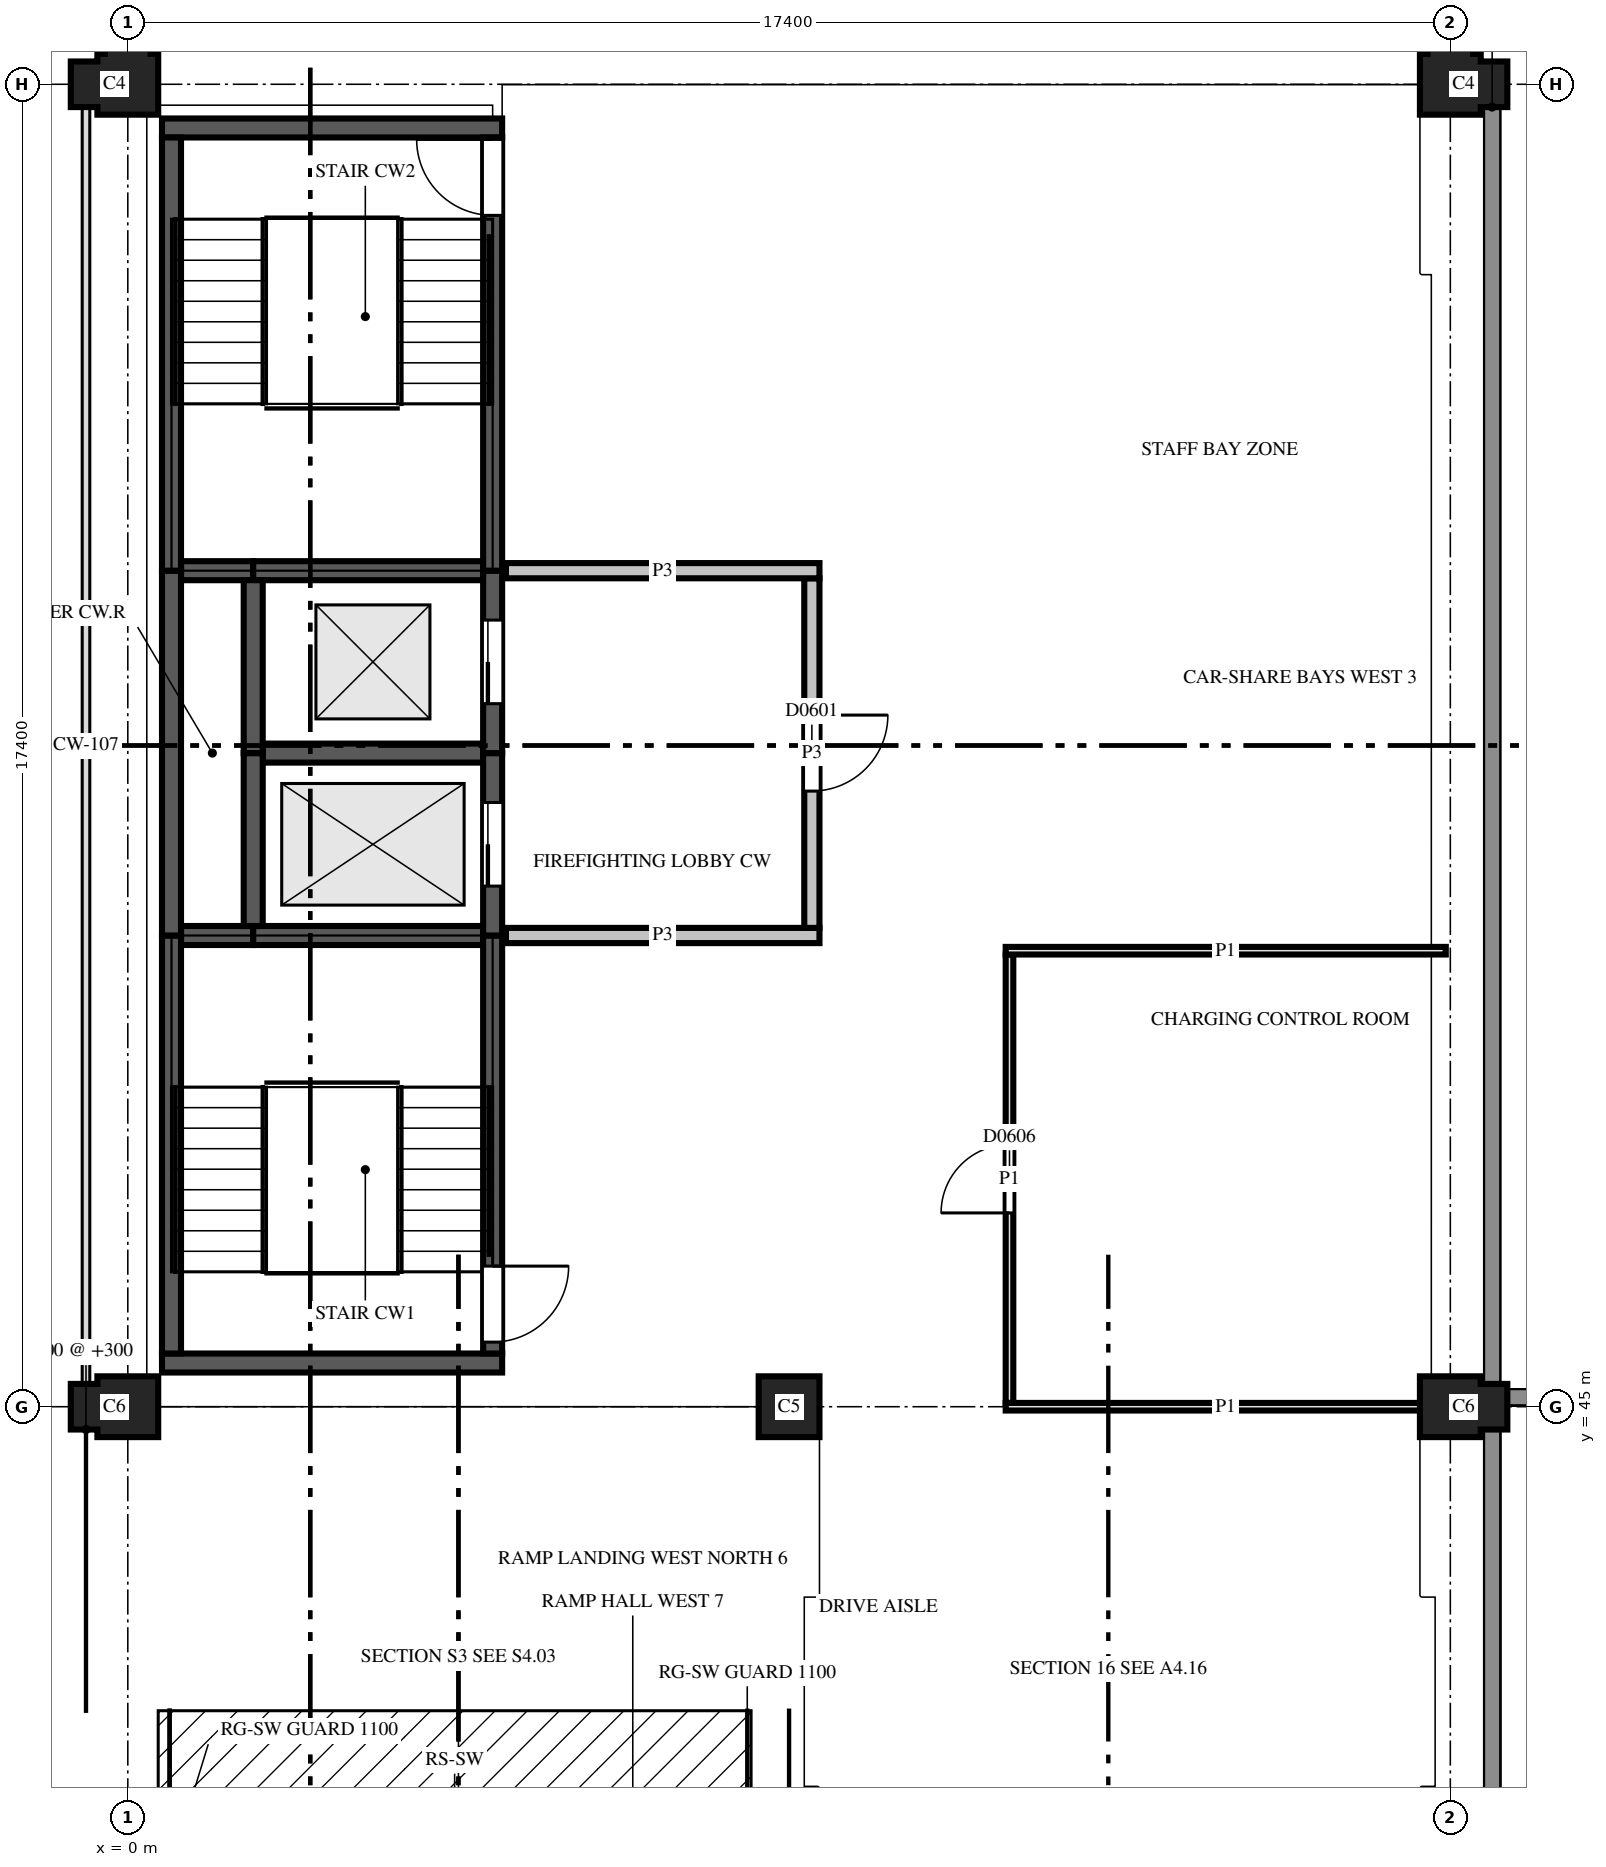
"""IFC4 building model, lengths in metres.
Left out: names, types, materials, properties, quantities, classifications, styles, units other than length and angle.
Written with IfcOpenShell. Run it as: python <this file> out.ifc"""

import sys

from ifc_helpers import new_model, si_unit, direction, frame, frame_2d, origin, place, context, subcontext, project, spatial, polyline, rectangle, outline, extrude, element, fill, save


model = new_model("IFC4")
c1 = context("Model", 3, precision=1e-05, world=origin(), true_north=direction((0.0, 1.0)))
c2 = subcontext(c1, "Body", "Model", "MODEL_VIEW")
j1 = project(units=[si_unit("LENGTHUNIT", "METRE"), si_unit("PLANEANGLEUNIT", "RADIAN")], contexts=[c1])
p1 = place(None, origin())
s1 = spatial("IfcSite", under=j1, at=p1, CompositionType="ELEMENT")
p2 = place(p1, origin())
s2 = spatial("IfcBuilding", under=s1, at=p2, CompositionType="ELEMENT")
p3 = place(p2, frame((0.0, 0.0, 23.0)))
s3 = spatial("IfcBuildingStorey", under=s2, at=p3, CompositionType="ELEMENT", Elevation=23.0)
p4 = place(p3, frame((0.0, 45.0, 0.0), z_axis=(0.0, 0.0, 1.0), x_axis=(-1.0, 0.0, 0.0)))
e1 = element("IfcColumn", 1, at=p4, inside=s3, PredefinedType="COLUMN", context=c2, shape_type="SweptSolid", body=[
    extrude(outline(polyline([(-0.4, -0.4), (0.4, -0.4), (0.4, -0.3), (0.75, -0.3), (0.75, 0.3), (0.4, 0.3), (0.4, 0.4), (-0.4, 0.4), (-0.4, -0.4)])), origin(), (0.0, 0.0, 1.0), 3.7),
])
p5 = place(p3, frame((8.7, 45.0, 0.0), z_axis=(0.0, 0.0, 1.0), x_axis=(1.0, 0.0, 0.0)))
e2 = element("IfcColumn", 2, at=p5, inside=s3, PredefinedType="COLUMN", context=c2, shape_type="SweptSolid", body=[
    extrude(outline(polyline([(-0.4, -0.4), (0.4, -0.4), (0.4, 0.4), (-0.4, 0.4), (-0.4, -0.4)])), origin(), (0.0, 0.0, 1.0), 3.7),
])
p6 = place(p3, frame((17.4, 45.0, 0.0), z_axis=(0.0, 0.0, 1.0), x_axis=(1.0, 0.0, 0.0)))
e3 = element("IfcColumn", 3, at=p6, inside=s3, PredefinedType="COLUMN", context=c2, shape_type="SweptSolid", body=[
    extrude(outline(polyline([(-0.4, -0.4), (0.4, -0.4), (0.4, -0.3), (0.75, -0.3), (0.75, 0.3), (0.4, 0.3), (0.4, 0.4), (-0.4, 0.4), (-0.4, -0.4)])), origin(), (0.0, 0.0, 1.0), 3.7),
])
for number, where, z_axis, x_axis in (
    (4, (0.0, 62.4, 0.0), (0.0, 0.0, 1.0), (0.0, 1.0, 0.0)),
    (5, (17.4, 62.4, 0.0), (0.0, 0.0, 1.0), (1.0, 0.0, 0.0)),
):
    element("IfcColumn", number, at=place(p3, frame(where, z_axis=z_axis, x_axis=x_axis)), inside=s3, PredefinedType="COLUMN", context=c2, shape_type="SweptSolid", body=[
        extrude(outline(polyline([(-0.4, -0.4), (0.4, -0.4), (0.4, -0.3), (0.75, -0.3), (0.75, 0.3), (0.4, 0.3), (0.4, 0.4), (0.3, 0.4), (0.3, 0.75), (-0.3, 0.75), (-0.3, 0.4), (-0.4, 0.4), (-0.4, -0.4)])), origin(), (0.0, 0.0, 1.0), 3.7),
    ])
p7 = place(p3, frame((0.45, 45.575, 0.0), z_axis=(0.0, 0.0, 1.0), x_axis=(1.0, 0.0, 0.0)))
e6 = element("IfcWall", 6, at=p7, inside=s3, PredefinedType="SHEAR", context=c2, shape_type="SweptSolid", body=[
    extrude(rectangle(XDim=4.475, YDim=0.25, at=frame_2d((2.238, 0.0))), origin(), (0.0, 0.0, 1.0), 3.7),
])
p8 = place(p3, frame((0.7, 51.2, 0.0), z_axis=(0.0, 0.0, 1.0), x_axis=(1.0, 0.0, 0.0)))
e7 = element("IfcWall", 7, at=p8, inside=s3, PredefinedType="SHEAR", context=c2, shape_type="SweptSolid", body=[
    extrude(rectangle(XDim=0.95, YDim=0.25, at=frame_2d((0.475, 0.0))), origin(), (0.0, 0.0, 1.0), 3.7),
])
p9 = place(p3, frame((1.65, 51.2, 0.0), z_axis=(0.0, 0.0, 1.0), x_axis=(1.0, 0.0, 0.0)))
e8 = element("IfcWall", 8, at=p9, inside=s3, PredefinedType="SHEAR", context=c2, shape_type="SweptSolid", body=[
    extrude(rectangle(XDim=3.025, YDim=0.25, at=frame_2d((1.513, 0.0))), origin(), (0.0, 0.0, 1.0), 3.7),
])
p10 = place(p3, frame((1.775, 53.6, 0.0), z_axis=(0.0, 0.0, 1.0), x_axis=(1.0, 0.0, 0.0)))
e9 = element("IfcWall", 9, at=p10, inside=s3, PredefinedType="SHEAR", context=c2, shape_type="SweptSolid", body=[
    extrude(rectangle(XDim=2.9, YDim=0.25, at=frame_2d((1.45, 0.0))), origin(), (0.0, 0.0, 1.0), 3.7),
])
p11 = place(p3, frame((0.7, 56.0, 0.0), z_axis=(0.0, 0.0, 1.0), x_axis=(1.0, 0.0, 0.0)))
e10 = element("IfcWall", 10, at=p11, inside=s3, PredefinedType="SHEAR", context=c2, shape_type="SweptSolid", body=[
    extrude(rectangle(XDim=0.95, YDim=0.25, at=frame_2d((0.475, 0.0))), origin(), (0.0, 0.0, 1.0), 3.7),
])
p12 = place(p3, frame((1.65, 56.0, 0.0), z_axis=(0.0, 0.0, 1.0), x_axis=(1.0, 0.0, 0.0)))
e11 = element("IfcWall", 11, at=p12, inside=s3, PredefinedType="SHEAR", context=c2, shape_type="SweptSolid", body=[
    extrude(rectangle(XDim=3.025, YDim=0.25, at=frame_2d((1.513, 0.0))), origin(), (0.0, 0.0, 1.0), 3.7),
])
p13 = place(p3, frame((0.45, 61.825, 0.0), z_axis=(0.0, 0.0, 1.0), x_axis=(1.0, 0.0, 0.0)))
e12 = element("IfcWall", 12, at=p13, inside=s3, PredefinedType="SHEAR", context=c2, shape_type="SweptSolid", body=[
    extrude(rectangle(XDim=4.475, YDim=0.25, at=frame_2d((2.238, 0.0))), origin(), (0.0, 0.0, 1.0), 3.7),
])
p14 = place(p3, frame((0.575, 45.7, 0.0), z_axis=(0.0, 0.0, 1.0), x_axis=(0.0, 1.0, 0.0)))
e13 = element("IfcWall", 13, at=p14, inside=s3, PredefinedType="SHEAR", context=c2, shape_type="SweptSolid", body=[
    extrude(rectangle(XDim=5.5, YDim=0.25, at=frame_2d((2.75, 0.0))), origin(), (0.0, 0.0, 1.0), 3.7),
])
p15 = place(p3, frame((0.575, 51.2, 0.0), z_axis=(0.0, 0.0, 1.0), x_axis=(0.0, 1.0, 0.0)))
e14 = element("IfcWall", 14, at=p15, inside=s3, PredefinedType="SHEAR", context=c2, shape_type="SweptSolid", body=[
    extrude(rectangle(XDim=4.8, YDim=0.25, at=frame_2d((2.4, 0.0))), origin(), (0.0, 0.0, 1.0), 3.7),
])
p16 = place(p3, frame((0.575, 56.0, 0.0), z_axis=(0.0, 0.0, 1.0), x_axis=(0.0, 1.0, 0.0)))
e15 = element("IfcWall", 15, at=p16, inside=s3, PredefinedType="SHEAR", context=c2, shape_type="SweptSolid", body=[
    extrude(rectangle(XDim=5.7, YDim=0.25, at=frame_2d((2.85, 0.0))), origin(), (0.0, 0.0, 1.0), 3.7),
])
p17 = place(p3, frame((1.65, 51.325, 0.0), z_axis=(0.0, 0.0, 1.0), x_axis=(0.0, 1.0, 0.0)))
e16 = element("IfcWall", 16, at=p17, inside=s3, PredefinedType="SHEAR", context=c2, shape_type="SweptSolid", body=[
    extrude(rectangle(XDim=2.275, YDim=0.25, at=frame_2d((1.138, 0.0))), origin(), (0.0, 0.0, 1.0), 3.7),
])
p18 = place(p3, frame((1.65, 53.6, 0.0), z_axis=(0.0, 0.0, 1.0), x_axis=(0.0, 1.0, 0.0)))
e17 = element("IfcWall", 17, at=p18, inside=s3, PredefinedType="SHEAR", context=c2, shape_type="SweptSolid", body=[
    extrude(rectangle(XDim=2.275, YDim=0.25, at=frame_2d((1.137, 0.0))), origin(), (0.0, 0.0, 1.0), 3.7),
])
p19 = place(p3, frame((4.8, 45.7, 0.0), z_axis=(0.0, 0.0, 1.0), x_axis=(0.0, 1.0, 0.0)))
e18 = element("IfcWall", 18, at=p19, inside=s3, PredefinedType="SHEAR", context=c2, shape_type="SweptSolid", body=[
    extrude(rectangle(XDim=5.5, YDim=0.25, at=frame_2d((2.75, 0.0))), origin(), (0.0, 0.0, 1.0), 3.7),
])
p20 = place(p19, frame((0.15, 0.0, 0.0)))
e19 = element("IfcOpeningElement", 19, at=p20, cuts=e18, PredefinedType="OPENING", context=c2, shape_type="SweptSolid", body=[
    extrude(rectangle(XDim=1.0, YDim=2.1, at=frame_2d((0.5, 1.05))), frame((0.0, 0.135, 0.0), z_axis=(0.0, -1.0, 0.0), x_axis=(1.0, 0.0, 0.0)), (0.0, 0.0, 1.0), 0.27),
])
p21 = place(p3, frame((4.8, 51.2, 0.0), z_axis=(0.0, 0.0, 1.0), x_axis=(0.0, 1.0, 0.0)))
e20 = element("IfcWall", 20, at=p21, inside=s3, PredefinedType="SHEAR", context=c2, shape_type="SweptSolid", body=[
    extrude(rectangle(XDim=2.4, YDim=0.25, at=frame_2d((1.2, 0.0))), origin(), (0.0, 0.0, 1.0), 3.7),
])
p22 = place(p21, frame((0.65, 0.0, 0.0)))
e21 = element("IfcOpeningElement", 21, at=p22, cuts=e20, PredefinedType="OPENING", context=c2, shape_type="SweptSolid", body=[
    extrude(rectangle(XDim=1.1, YDim=2.1, at=frame_2d((0.55, 1.05))), frame((0.0, 0.135, 0.0), z_axis=(0.0, -1.0, 0.0), x_axis=(1.0, 0.0, 0.0)), (0.0, 0.0, 1.0), 0.27),
])
p23 = place(p3, frame((4.8, 53.6, 0.0), z_axis=(0.0, 0.0, 1.0), x_axis=(0.0, 1.0, 0.0)))
e22 = element("IfcWall", 22, at=p23, inside=s3, PredefinedType="SHEAR", context=c2, shape_type="SweptSolid", body=[
    extrude(rectangle(XDim=2.4, YDim=0.25, at=frame_2d((1.2, 0.0))), origin(), (0.0, 0.0, 1.0), 3.7),
])
p24 = place(p23, frame((0.65, 0.0, 0.0)))
e23 = element("IfcOpeningElement", 23, at=p24, cuts=e22, PredefinedType="OPENING", context=c2, shape_type="SweptSolid", body=[
    extrude(rectangle(XDim=1.1, YDim=2.1, at=frame_2d((0.55, 1.05))), frame((0.0, 0.135, 0.0), z_axis=(0.0, -1.0, 0.0), x_axis=(1.0, 0.0, 0.0)), (0.0, 0.0, 1.0), 0.27),
])
p25 = place(p3, frame((4.8, 56.0, 0.0), z_axis=(0.0, 0.0, 1.0), x_axis=(0.0, 1.0, 0.0)))
e24 = element("IfcWall", 24, at=p25, inside=s3, PredefinedType="SHEAR", context=c2, shape_type="SweptSolid", body=[
    extrude(rectangle(XDim=5.7, YDim=0.25, at=frame_2d((2.85, 0.0))), origin(), (0.0, 0.0, 1.0), 3.7),
])
p26 = place(p25, frame((4.675, 0.0, 0.0)))
e25 = element("IfcOpeningElement", 25, at=p26, cuts=e24, PredefinedType="OPENING", context=c2, shape_type="SweptSolid", body=[
    extrude(rectangle(XDim=1.0, YDim=2.1, at=frame_2d((0.5, 1.05))), frame((0.0, 0.135, 0.0), z_axis=(0.0, -1.0, 0.0), x_axis=(1.0, 0.0, 0.0)), (0.0, 0.0, 1.0), 0.27),
])
p27 = place(p3, frame((11.55, 45.0, 0.0), z_axis=(0.0, 0.0, 1.0), x_axis=(1.0, 0.0, 0.0)))
e26 = element("IfcWall", 26, at=p27, inside=s3, PredefinedType="PARTITIONING", context=c2, shape_type="SweptSolid", body=[
    extrude(rectangle(XDim=5.79, YDim=0.1, at=frame_2d((2.895, 0.0))), origin(), (0.0, 0.0, 1.0), 2.88),
])
p28 = place(p3, frame((11.6, 50.95, 0.0), z_axis=(0.0, 0.0, 1.0), x_axis=(0.0, -1.0, 0.0)))
e27 = element("IfcWall", 27, at=p28, inside=s3, PredefinedType="PARTITIONING", context=c2, shape_type="SweptSolid", body=[
    extrude(rectangle(XDim=5.9, YDim=0.1, at=frame_2d((2.95, 0.0))), origin(), (0.0, 0.0, 1.0), 2.88),
])
p29 = place(p28, frame((2.5, 0.0, 0.0)))
e28 = element("IfcOpeningElement", 28, at=p29, cuts=e27, PredefinedType="OPENING", context=c2, shape_type="SweptSolid", body=[
    extrude(rectangle(XDim=0.9, YDim=2.1, at=frame_2d((0.45, 1.05))), frame((0.0, 0.06, 0.0), z_axis=(0.0, -1.0, 0.0), x_axis=(1.0, 0.0, 0.0)), (0.0, 0.0, 1.0), 0.12),
])
p30 = place(p3, frame((17.34, 51.0, 0.0), z_axis=(0.0, 0.0, 1.0), x_axis=(-1.0, 0.0, 0.0)))
e29 = element("IfcWall", 29, at=p30, inside=s3, PredefinedType="PARTITIONING", context=c2, shape_type="SweptSolid", body=[
    extrude(rectangle(XDim=5.79, YDim=0.1, at=frame_2d((2.895, 0.0))), origin(), (0.0, 0.0, 1.0), 2.88),
])
p31 = place(p3, frame((4.975, 51.2, 0.0), z_axis=(0.0, 0.0, 1.0), x_axis=(1.0, 0.0, 0.0)))
e30 = element("IfcWall", 30, at=p31, inside=s3, PredefinedType="PARTITIONING", context=c2, shape_type="SweptSolid", body=[
    extrude(rectangle(XDim=4.125, YDim=0.2, at=frame_2d((2.062, 0.0))), origin(), (0.0, 0.0, 1.0), 2.88),
])
p32 = place(p3, frame((9.0, 51.3, 0.0), z_axis=(0.0, 0.0, 1.0), x_axis=(0.0, 1.0, 0.0)))
e31 = element("IfcWall", 31, at=p32, inside=s3, PredefinedType="PARTITIONING", context=c2, shape_type="SweptSolid", body=[
    extrude(rectangle(XDim=4.6, YDim=0.2, at=frame_2d((2.3, 0.0))), origin(), (0.0, 0.0, 1.0), 2.88),
])
p33 = place(p32, frame((1.8, 0.0, 0.0)))
e32 = element("IfcOpeningElement", 32, at=p33, cuts=e31, PredefinedType="OPENING", context=c2, shape_type="SweptSolid", body=[
    extrude(rectangle(XDim=1.0, YDim=2.1, at=frame_2d((0.5, 1.05))), frame((0.0, 0.11, 0.0), z_axis=(0.0, -1.0, 0.0), x_axis=(1.0, 0.0, 0.0)), (0.0, 0.0, 1.0), 0.22),
])
p34 = place(p3, frame((9.1, 56.0, 0.0), z_axis=(0.0, 0.0, 1.0), x_axis=(-1.0, 0.0, 0.0)))
e33 = element("IfcWall", 33, at=p34, inside=s3, PredefinedType="PARTITIONING", context=c2, shape_type="SweptSolid", body=[
    extrude(rectangle(XDim=4.125, YDim=0.2, at=frame_2d((2.062, 0.0))), origin(), (0.0, 0.0, 1.0), 2.88),
])
p35 = place(p33, origin())
e34 = element("IfcDoor", 34, at=p35, inside=s3, OperationType="SINGLE_SWING_RIGHT", PredefinedType="DOOR", context=c2, shape_type="SweptSolid", body=[
    extrude(rectangle(XDim=1.0, YDim=2.1, at=frame_2d((0.5, 1.05))), frame((0.0, 0.025, 0.0), z_axis=(0.0, -1.0, 0.0), x_axis=(1.0, 0.0, 0.0)), (0.0, 0.0, 1.0), 0.05),
])
fill(e32, e34)
p36 = place(p29, origin())
e35 = element("IfcDoor", 35, at=p36, inside=s3, OperationType="SINGLE_SWING_RIGHT", PredefinedType="DOOR", context=c2, shape_type="SweptSolid", body=[
    extrude(rectangle(XDim=0.9, YDim=2.1, at=frame_2d((0.45, 1.05))), frame((0.0, 0.025, 0.0), z_axis=(0.0, -1.0, 0.0), x_axis=(1.0, 0.0, 0.0)), (0.0, 0.0, 1.0), 0.05),
])
fill(e28, e35)
p37 = place(p22, origin())
e36 = element("IfcDoor", 36, at=p37, inside=s3, OperationType="SLIDING_TO_LEFT", PredefinedType="DOOR", context=c2, shape_type="SweptSolid", body=[
    extrude(rectangle(XDim=1.1, YDim=2.1, at=frame_2d((0.55, 1.05))), frame((0.0, 0.025, 0.0), z_axis=(0.0, -1.0, 0.0), x_axis=(1.0, 0.0, 0.0)), (0.0, 0.0, 1.0), 0.05),
])
fill(e21, e36)
p38 = place(p24, origin())
e37 = element("IfcDoor", 37, at=p38, inside=s3, OperationType="SLIDING_TO_LEFT", PredefinedType="DOOR", context=c2, shape_type="SweptSolid", body=[
    extrude(rectangle(XDim=1.1, YDim=2.1, at=frame_2d((0.55, 1.05))), frame((0.0, 0.025, 0.0), z_axis=(0.0, -1.0, 0.0), x_axis=(1.0, 0.0, 0.0)), (0.0, 0.0, 1.0), 0.05),
])
fill(e23, e37)
p39 = place(p26, origin())
e38 = element("IfcDoor", 38, at=p39, inside=s3, OperationType="SINGLE_SWING_LEFT", PredefinedType="DOOR", context=c2, shape_type="SweptSolid", body=[
    extrude(rectangle(XDim=1.0, YDim=2.1, at=frame_2d((0.5, 1.05))), frame((0.0, 0.025, 0.0), z_axis=(0.0, -1.0, 0.0), x_axis=(1.0, 0.0, 0.0)), (0.0, 0.0, 1.0), 0.05),
])
fill(e25, e38)
p40 = place(p20, origin())
e39 = element("IfcDoor", 39, at=p40, inside=s3, OperationType="SINGLE_SWING_RIGHT", PredefinedType="DOOR", context=c2, shape_type="SweptSolid", body=[
    extrude(rectangle(XDim=1.0, YDim=2.1, at=frame_2d((0.5, 1.05))), frame((0.0, 0.025, 0.0), z_axis=(0.0, -1.0, 0.0), x_axis=(1.0, 0.0, 0.0)), (0.0, 0.0, 1.0), 0.05),
])
fill(e19, e39)
save(model, sys.argv[1])
